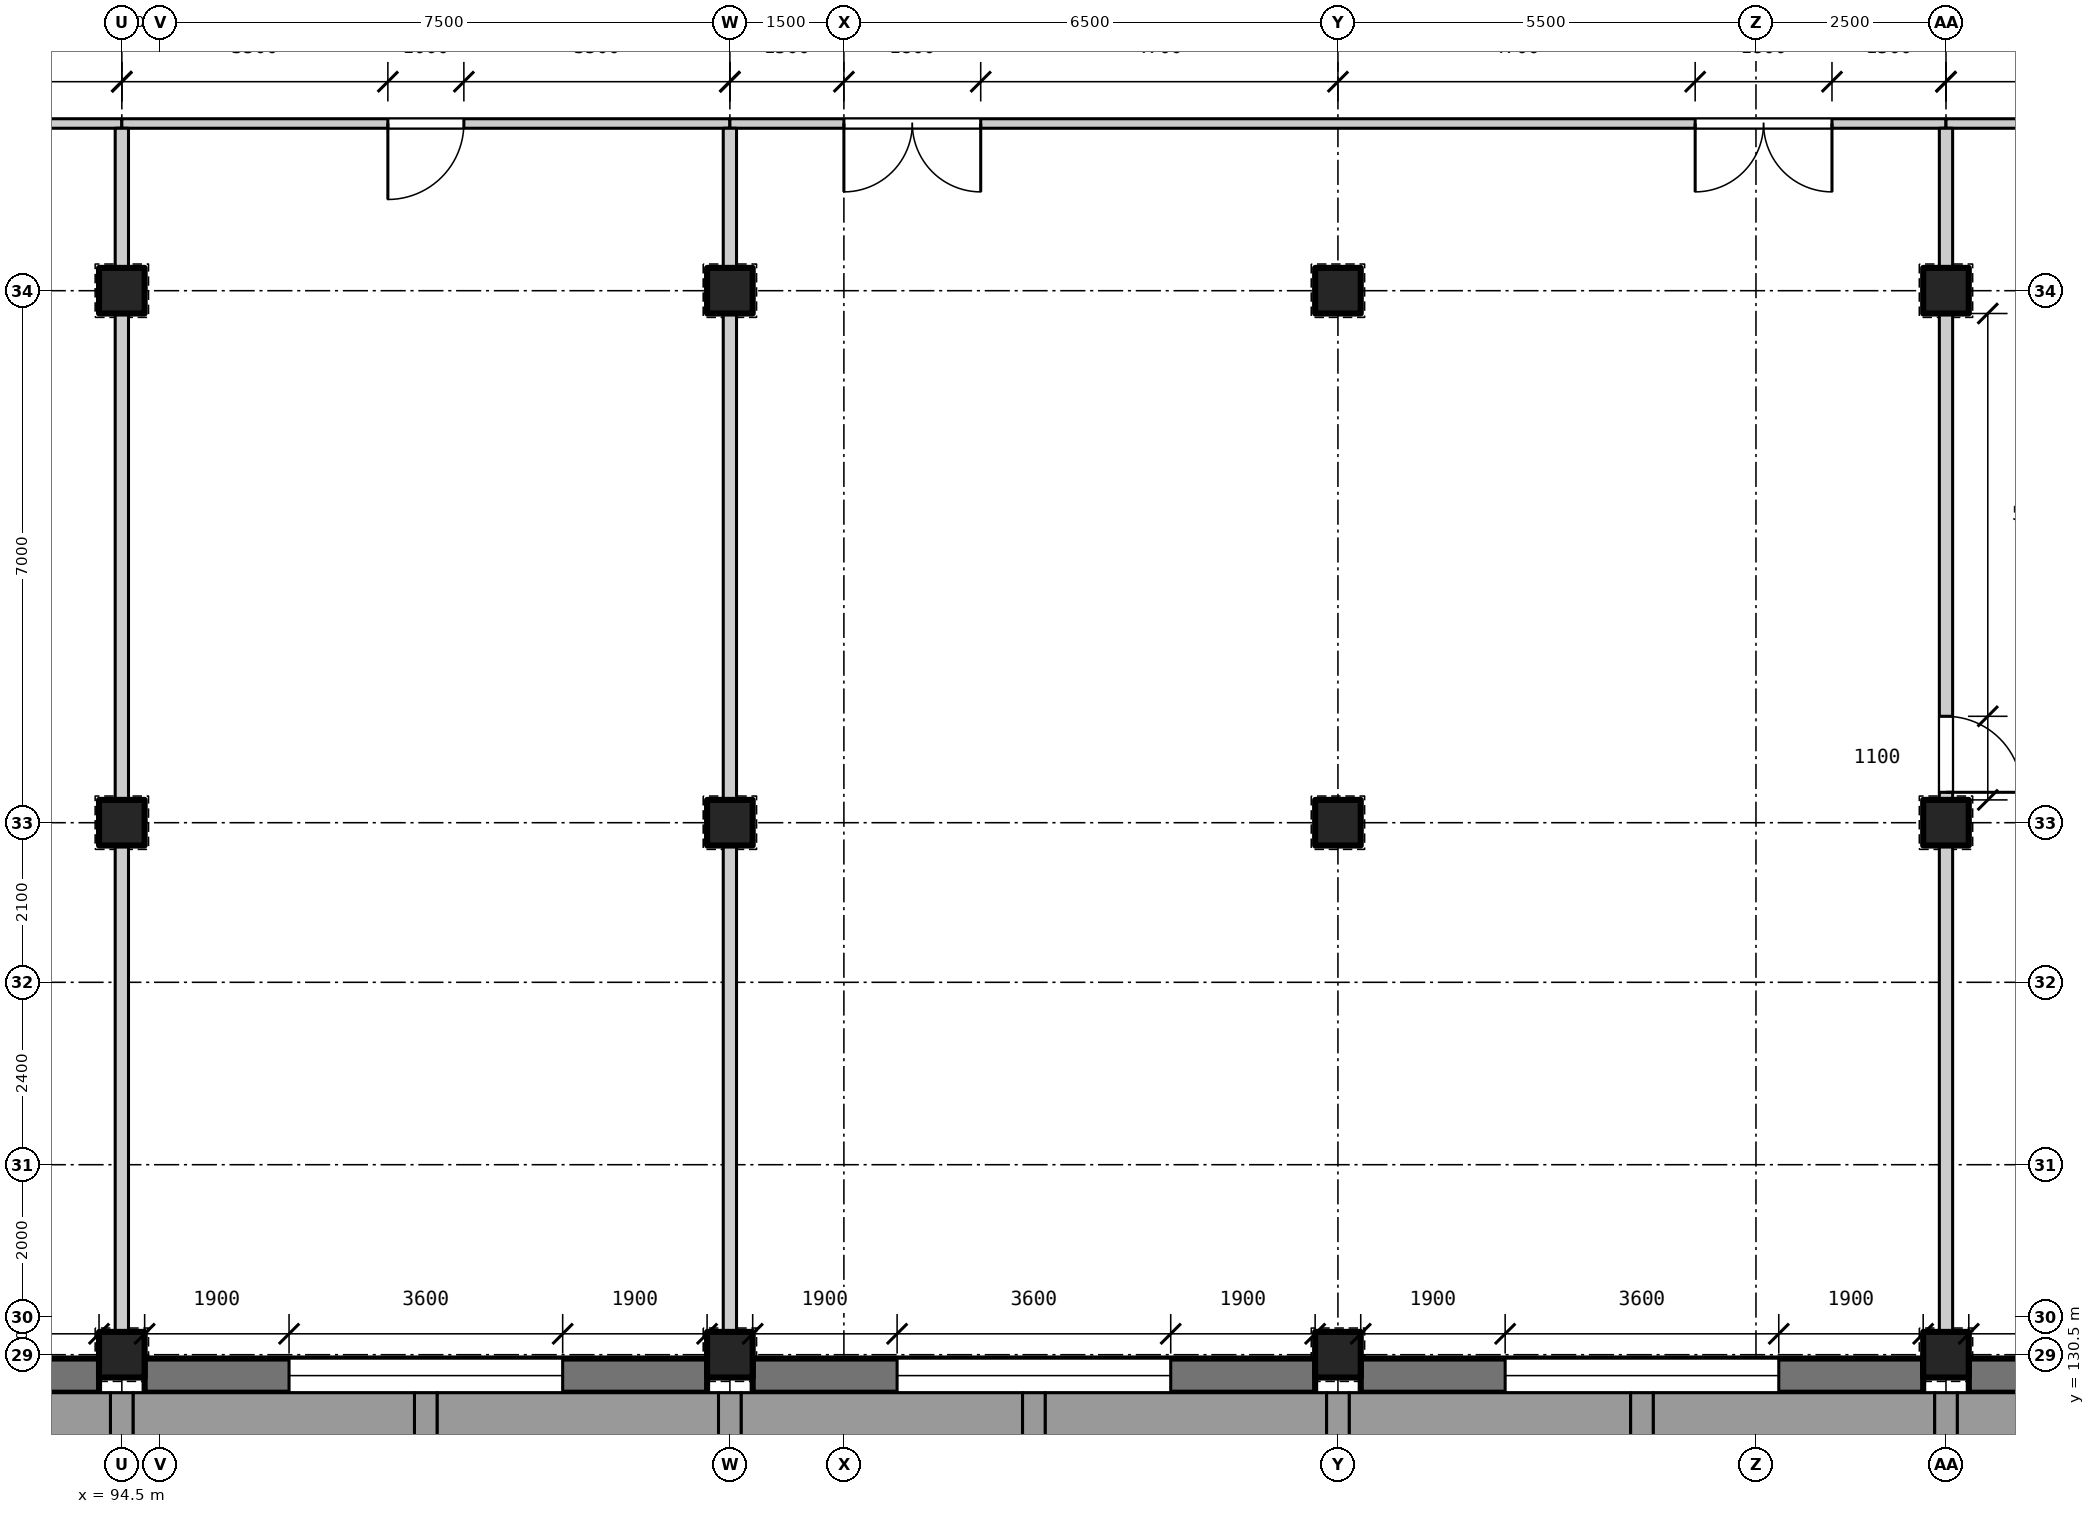
"""IFC4 building model, lengths in metres.
Left out: names, types, materials, properties, quantities, classifications, styles, units other than length and angle.
Written with IfcOpenShell. Run it as: python <this file> out.ifc"""

import sys

from ifc_helpers import new_model, si_unit, direction, frame, frame_2d, origin, origin_2d, place, context, subcontext, project, spatial, rectangle, extrude, element, fill, save


model = new_model("IFC4")
c1 = context("Model", 3, precision=1e-05, world=origin(), true_north=direction((0.0, 1.0)))
c2 = subcontext(c1, "Body", "Model", "MODEL_VIEW")
j1 = project(units=[si_unit("LENGTHUNIT", "METRE"), si_unit("PLANEANGLEUNIT", "RADIAN")], contexts=[c1])
p1 = place(None, origin())
s1 = spatial("IfcSite", under=j1, at=p1, CompositionType="ELEMENT")
p2 = place(p1, origin())
s2 = spatial("IfcBuilding", under=s1, at=p2, CompositionType="ELEMENT")
p3 = place(p2, frame((0.0, 0.0, 10.2)))
s3 = spatial("IfcBuildingStorey", under=s2, at=p3, CompositionType="ELEMENT", Elevation=10.2)
for number, where, z_axis, x_axis in (
    (1, (94.5, 130.5, 0.0), (0.0, 0.0, 1.0), (1.0, 0.0, 0.0)),
    (2, (94.5, 137.5, 0.0), (0.0, 0.0, 1.0), (1.0, 0.0, 0.0)),
    (3, (94.5, 144.5, 0.0), (0.0, 0.0, 1.0), (1.0, 0.0, 0.0)),
    (4, (102.5, 130.5, 0.0), (0.0, 0.0, 1.0), (1.0, 0.0, 0.0)),
    (5, (102.5, 137.5, 0.0), (0.0, 0.0, 1.0), (1.0, 0.0, 0.0)),
    (6, (102.5, 144.5, 0.0), (0.0, 0.0, 1.0), (1.0, 0.0, 0.0)),
    (7, (110.5, 130.5, 0.0), (0.0, 0.0, 1.0), (1.0, 0.0, 0.0)),
    (8, (110.5, 137.5, 0.0), (0.0, 0.0, 1.0), (1.0, 0.0, 0.0)),
    (9, (110.5, 144.5, 0.0), (0.0, 0.0, 1.0), (1.0, 0.0, 0.0)),
    (10, (118.5, 130.5, 0.0), (0.0, 0.0, 1.0), (1.0, 0.0, 0.0)),
    (11, (118.5, 137.5, 0.0), (0.0, 0.0, 1.0), (1.0, 0.0, 0.0)),
    (12, (118.5, 144.5, 0.0), (0.0, 0.0, 1.0), (1.0, 0.0, 0.0)),
):
    element("IfcColumn", number, at=place(p3, frame(where, z_axis=z_axis, x_axis=x_axis)), inside=s3, PredefinedType="COLUMN", context=c2, shape_type="SweptSolid", body=[
        extrude(rectangle(XDim=0.6, YDim=0.6, at=origin_2d()), origin(), (0.0, 0.0, 1.0), 4.2),
    ])
p4 = place(p3, frame((94.2, 130.225, 0.0), z_axis=(0.0, 0.0, 1.0), x_axis=(-1.0, 0.0, 0.0)))
e13 = element("IfcWall", 13, at=p4, inside=s3, PredefinedType="SOLIDWALL", context=c2, shape_type="SweptSolid", body=[
    extrude(rectangle(XDim=7.4, YDim=0.45, at=frame_2d((3.7, 0.0))), origin(), (0.0, 0.0, 1.0), 3.1),
])
p5 = place(p4, frame((1.9, 0.0, 0.9)))
e14 = element("IfcOpeningElement", 14, at=p5, cuts=e13, PredefinedType="OPENING", context=c2, shape_type="SweptSolid", body=[
    extrude(rectangle(XDim=3.6, YDim=1.6, at=frame_2d((1.8, 0.8))), frame((0.0, 0.235, 0.0), z_axis=(0.0, -1.0, 0.0), x_axis=(1.0, 0.0, 0.0)), (0.0, 0.0, 1.0), 0.47),
])
p6 = place(p3, frame((102.2, 130.225, 0.0), z_axis=(0.0, 0.0, 1.0), x_axis=(-1.0, 0.0, 0.0)))
e15 = element("IfcWall", 15, at=p6, inside=s3, PredefinedType="SOLIDWALL", context=c2, shape_type="SweptSolid", body=[
    extrude(rectangle(XDim=7.4, YDim=0.45, at=frame_2d((3.7, 0.0))), origin(), (0.0, 0.0, 1.0), 3.1),
])
p7 = place(p6, frame((1.9, 0.0, 0.9)))
e16 = element("IfcOpeningElement", 16, at=p7, cuts=e15, PredefinedType="OPENING", context=c2, shape_type="SweptSolid", body=[
    extrude(rectangle(XDim=3.6, YDim=1.6, at=frame_2d((1.8, 0.8))), frame((0.0, 0.235, 0.0), z_axis=(0.0, -1.0, 0.0), x_axis=(1.0, 0.0, 0.0)), (0.0, 0.0, 1.0), 0.47),
])
p8 = place(p3, frame((110.2, 130.225, 0.0), z_axis=(0.0, 0.0, 1.0), x_axis=(-1.0, 0.0, 0.0)))
e17 = element("IfcWall", 17, at=p8, inside=s3, PredefinedType="SOLIDWALL", context=c2, shape_type="SweptSolid", body=[
    extrude(rectangle(XDim=7.4, YDim=0.45, at=frame_2d((3.7, 0.0))), origin(), (0.0, 0.0, 1.0), 3.1),
])
p9 = place(p8, frame((1.9, 0.0, 0.9)))
e18 = element("IfcOpeningElement", 18, at=p9, cuts=e17, PredefinedType="OPENING", context=c2, shape_type="SweptSolid", body=[
    extrude(rectangle(XDim=3.6, YDim=1.6, at=frame_2d((1.8, 0.8))), frame((0.0, 0.235, 0.0), z_axis=(0.0, -1.0, 0.0), x_axis=(1.0, 0.0, 0.0)), (0.0, 0.0, 1.0), 0.47),
])
p10 = place(p3, frame((118.2, 130.225, 0.0), z_axis=(0.0, 0.0, 1.0), x_axis=(-1.0, 0.0, 0.0)))
e19 = element("IfcWall", 19, at=p10, inside=s3, PredefinedType="SOLIDWALL", context=c2, shape_type="SweptSolid", body=[
    extrude(rectangle(XDim=7.4, YDim=0.45, at=frame_2d((3.7, 0.0))), origin(), (0.0, 0.0, 1.0), 3.1),
])
p11 = place(p10, frame((1.9, 0.0, 0.9)))
e20 = element("IfcOpeningElement", 20, at=p11, cuts=e19, PredefinedType="OPENING", context=c2, shape_type="SweptSolid", body=[
    extrude(rectangle(XDim=3.6, YDim=1.6, at=frame_2d((1.8, 0.8))), frame((0.0, 0.235, 0.0), z_axis=(0.0, -1.0, 0.0), x_axis=(1.0, 0.0, 0.0)), (0.0, 0.0, 1.0), 0.47),
])
p12 = place(p3, frame((126.2, 130.225, 0.0), z_axis=(0.0, 0.0, 1.0), x_axis=(-1.0, 0.0, 0.0)))
e21 = element("IfcWall", 21, at=p12, inside=s3, PredefinedType="SOLIDWALL", context=c2, shape_type="SweptSolid", body=[
    extrude(rectangle(XDim=7.4, YDim=0.45, at=frame_2d((3.7, 0.0))), origin(), (0.0, 0.0, 1.0), 3.1),
])
p13 = place(p12, frame((1.9, 0.0, 0.9)))
e22 = element("IfcOpeningElement", 22, at=p13, cuts=e21, PredefinedType="OPENING", context=c2, shape_type="SweptSolid", body=[
    extrude(rectangle(XDim=3.6, YDim=1.6, at=frame_2d((1.8, 0.8))), frame((0.0, 0.235, 0.0), z_axis=(0.0, -1.0, 0.0), x_axis=(1.0, 0.0, 0.0)), (0.0, 0.0, 1.0), 0.47),
])
p14 = place(p3, frame((86.45, 146.7, 0.0), z_axis=(0.0, 0.0, 1.0), x_axis=(1.0, 0.0, 0.0)))
e23 = element("IfcWall", 23, at=p14, inside=s3, PredefinedType="PARTITIONING", context=c2, shape_type="SweptSolid", body=[
    extrude(rectangle(XDim=8.05, YDim=0.125, at=frame_2d((4.025, 0.0))), origin(), (0.0, 0.0, 1.0), 3.9),
])
p15 = place(p14, frame((3.55, 0.0, 0.0)))
e24 = element("IfcOpeningElement", 24, at=p15, cuts=e23, PredefinedType="OPENING", context=c2, shape_type="SweptSolid", body=[
    extrude(rectangle(XDim=1.0, YDim=2.1, at=frame_2d((0.5, 1.05))), frame((0.0, 0.073, 0.0), z_axis=(0.0, -1.0, 0.0), x_axis=(1.0, 0.0, 0.0)), (0.0, 0.0, 1.0), 0.145),
])
p16 = place(p3, frame((94.5, 146.7, 0.0), z_axis=(0.0, 0.0, 1.0), x_axis=(1.0, 0.0, 0.0)))
e25 = element("IfcWall", 25, at=p16, inside=s3, PredefinedType="PARTITIONING", context=c2, shape_type="SweptSolid", body=[
    extrude(rectangle(XDim=8.0, YDim=0.125, at=frame_2d((4.0, 0.0))), origin(), (0.0, 0.0, 1.0), 3.9),
])
p17 = place(p16, frame((3.5, 0.0, 0.0)))
e26 = element("IfcOpeningElement", 26, at=p17, cuts=e25, PredefinedType="OPENING", context=c2, shape_type="SweptSolid", body=[
    extrude(rectangle(XDim=1.0, YDim=2.1, at=frame_2d((0.5, 1.05))), frame((0.0, 0.073, 0.0), z_axis=(0.0, -1.0, 0.0), x_axis=(1.0, 0.0, 0.0)), (0.0, 0.0, 1.0), 0.145),
])
p18 = place(p3, frame((102.5, 146.7, 0.0), z_axis=(0.0, 0.0, 1.0), x_axis=(1.0, 0.0, 0.0)))
e27 = element("IfcWall", 27, at=p18, inside=s3, PredefinedType="PARTITIONING", context=c2, shape_type="SweptSolid", body=[
    extrude(rectangle(XDim=16.0, YDim=0.125, at=frame_2d((8.0, 0.0))), origin(), (0.0, 0.0, 1.0), 3.9),
])
p19 = place(p18, frame((1.5, 0.0, 0.0)))
e28 = element("IfcOpeningElement", 28, at=p19, cuts=e27, PredefinedType="OPENING", context=c2, shape_type="SweptSolid", body=[
    extrude(rectangle(XDim=1.8, YDim=2.1, at=frame_2d((0.9, 1.05))), frame((0.0, 0.073, 0.0), z_axis=(0.0, -1.0, 0.0), x_axis=(1.0, 0.0, 0.0)), (0.0, 0.0, 1.0), 0.145),
])
p20 = place(p18, frame((12.7, 0.0, 0.0)))
e29 = element("IfcOpeningElement", 29, at=p20, cuts=e27, PredefinedType="OPENING", context=c2, shape_type="SweptSolid", body=[
    extrude(rectangle(XDim=1.8, YDim=2.1, at=frame_2d((0.9, 1.05))), frame((0.0, 0.073, 0.0), z_axis=(0.0, -1.0, 0.0), x_axis=(1.0, 0.0, 0.0)), (0.0, 0.0, 1.0), 0.145),
])
p21 = place(p3, frame((118.5, 146.7, 0.0), z_axis=(0.0, 0.0, 1.0), x_axis=(1.0, 0.0, 0.0)))
e30 = element("IfcWall", 30, at=p21, inside=s3, PredefinedType="PARTITIONING", context=c2, shape_type="SweptSolid", body=[
    extrude(rectangle(XDim=8.0, YDim=0.125, at=frame_2d((4.0, 0.0))), origin(), (0.0, 0.0, 1.0), 3.9),
])
p22 = place(p21, frame((3.5, 0.0, 0.0)))
e31 = element("IfcOpeningElement", 31, at=p22, cuts=e30, PredefinedType="OPENING", context=c2, shape_type="SweptSolid", body=[
    extrude(rectangle(XDim=1.0, YDim=2.1, at=frame_2d((0.5, 1.05))), frame((0.0, 0.073, 0.0), z_axis=(0.0, -1.0, 0.0), x_axis=(1.0, 0.0, 0.0)), (0.0, 0.0, 1.0), 0.145),
])
for number, where, z_axis, x_axis in (
    (32, (94.5, 130.8, 0.0), (0.0, 0.0, 1.0), (0.0, 1.0, 0.0)),
    (33, (94.5, 137.8, 0.0), (0.0, 0.0, 1.0), (0.0, 1.0, 0.0)),
):
    element("IfcWall", number, at=place(p3, frame(where, z_axis=z_axis, x_axis=x_axis)), inside=s3, PredefinedType="PARTITIONING", context=c2, shape_type="SweptSolid", body=[
        extrude(rectangle(XDim=6.4, YDim=0.175, at=frame_2d((3.2, 0.0))), origin(), (0.0, 0.0, 1.0), 3.2),
    ])
p23 = place(p3, frame((94.5, 144.8, 0.0), z_axis=(0.0, 0.0, 1.0), x_axis=(0.0, 1.0, 0.0)))
e34 = element("IfcWall", 34, at=p23, inside=s3, PredefinedType="PARTITIONING", context=c2, shape_type="SweptSolid", body=[
    extrude(rectangle(XDim=1.837, YDim=0.175, at=frame_2d((0.919, 0.0))), origin(), (0.0, 0.0, 1.0), 3.2),
])
for number, where, z_axis, x_axis in (
    (35, (102.5, 130.8, 0.0), (0.0, 0.0, 1.0), (0.0, 1.0, 0.0)),
    (36, (102.5, 137.8, 0.0), (0.0, 0.0, 1.0), (0.0, 1.0, 0.0)),
):
    element("IfcWall", number, at=place(p3, frame(where, z_axis=z_axis, x_axis=x_axis)), inside=s3, PredefinedType="PARTITIONING", context=c2, shape_type="SweptSolid", body=[
        extrude(rectangle(XDim=6.4, YDim=0.175, at=frame_2d((3.2, 0.0))), origin(), (0.0, 0.0, 1.0), 3.2),
    ])
p24 = place(p3, frame((102.5, 144.8, 0.0), z_axis=(0.0, 0.0, 1.0), x_axis=(0.0, 1.0, 0.0)))
e37 = element("IfcWall", 37, at=p24, inside=s3, PredefinedType="PARTITIONING", context=c2, shape_type="SweptSolid", body=[
    extrude(rectangle(XDim=1.837, YDim=0.175, at=frame_2d((0.919, 0.0))), origin(), (0.0, 0.0, 1.0), 3.2),
])
p25 = place(p3, frame((118.5, 130.8, 0.0), z_axis=(0.0, 0.0, 1.0), x_axis=(0.0, 1.0, 0.0)))
e38 = element("IfcWall", 38, at=p25, inside=s3, PredefinedType="PARTITIONING", context=c2, shape_type="SweptSolid", body=[
    extrude(rectangle(XDim=6.4, YDim=0.175, at=frame_2d((3.2, 0.0))), origin(), (0.0, 0.0, 1.0), 3.2),
])
p26 = place(p3, frame((118.5, 137.8, 0.0), z_axis=(0.0, 0.0, 1.0), x_axis=(0.0, 1.0, 0.0)))
e39 = element("IfcWall", 39, at=p26, inside=s3, PredefinedType="PARTITIONING", context=c2, shape_type="SweptSolid", body=[
    extrude(rectangle(XDim=6.4, YDim=0.175, at=frame_2d((3.2, 0.0))), origin(), (0.0, 0.0, 1.0), 3.2),
])
p27 = place(p26, frame((0.1, 0.0, 0.0)))
e40 = element("IfcOpeningElement", 40, at=p27, cuts=e39, PredefinedType="OPENING", context=c2, shape_type="SweptSolid", body=[
    extrude(rectangle(XDim=1.0, YDim=2.1, at=frame_2d((0.5, 1.05))), frame((0.0, 0.097, 0.0), z_axis=(0.0, -1.0, 0.0), x_axis=(1.0, 0.0, 0.0)), (0.0, 0.0, 1.0), 0.195),
])
p28 = place(p3, frame((118.5, 144.8, 0.0), z_axis=(0.0, 0.0, 1.0), x_axis=(0.0, 1.0, 0.0)))
e41 = element("IfcWall", 41, at=p28, inside=s3, PredefinedType="PARTITIONING", context=c2, shape_type="SweptSolid", body=[
    extrude(rectangle(XDim=1.837, YDim=0.175, at=frame_2d((0.919, 0.0))), origin(), (0.0, 0.0, 1.0), 3.2),
])
p29 = place(p7, origin())
e42 = element("IfcWindow", 42, at=p29, inside=s3, PartitioningType="SINGLE_PANEL", PredefinedType="WINDOW", context=c2, shape_type="SweptSolid", body=[
    extrude(rectangle(XDim=3.6, YDim=1.6, at=frame_2d((1.8, 0.8))), frame((0.0, -0.125, 0.0), z_axis=(0.0, -1.0, 0.0), x_axis=(1.0, 0.0, 0.0)), (0.0, 0.0, 1.0), 0.06),
])
fill(e16, e42)
p30 = place(p9, origin())
e43 = element("IfcWindow", 43, at=p30, inside=s3, PartitioningType="SINGLE_PANEL", PredefinedType="WINDOW", context=c2, shape_type="SweptSolid", body=[
    extrude(rectangle(XDim=3.6, YDim=1.6, at=frame_2d((1.8, 0.8))), frame((0.0, -0.125, 0.0), z_axis=(0.0, -1.0, 0.0), x_axis=(1.0, 0.0, 0.0)), (0.0, 0.0, 1.0), 0.06),
])
fill(e18, e43)
p31 = place(p11, origin())
e44 = element("IfcWindow", 44, at=p31, inside=s3, PartitioningType="SINGLE_PANEL", PredefinedType="WINDOW", context=c2, shape_type="SweptSolid", body=[
    extrude(rectangle(XDim=3.6, YDim=1.6, at=frame_2d((1.8, 0.8))), frame((0.0, -0.125, 0.0), z_axis=(0.0, -1.0, 0.0), x_axis=(1.0, 0.0, 0.0)), (0.0, 0.0, 1.0), 0.06),
])
fill(e20, e44)
p32 = place(p27, frame((1.0, 0.0, 0.0), z_axis=(0.0, 0.0, 1.0), x_axis=(-1.0, 0.0, 0.0)))
e45 = element("IfcDoor", 45, at=p32, inside=s3, OperationType="SINGLE_SWING_RIGHT", PredefinedType="DOOR", context=c2, shape_type="SweptSolid", body=[
    extrude(rectangle(XDim=1.0, YDim=2.1, at=frame_2d((0.5, 1.05))), frame((0.0, 0.025, 0.0), z_axis=(0.0, -1.0, 0.0), x_axis=(1.0, 0.0, 0.0)), (0.0, 0.0, 1.0), 0.05),
])
fill(e40, e45)
p33 = place(p17, frame((1.0, 0.0, 0.0), z_axis=(0.0, 0.0, 1.0), x_axis=(-1.0, 0.0, 0.0)))
e46 = element("IfcDoor", 46, at=p33, inside=s3, OperationType="SINGLE_SWING_RIGHT", PredefinedType="DOOR", context=c2, shape_type="SweptSolid", body=[
    extrude(rectangle(XDim=1.0, YDim=2.1, at=frame_2d((0.5, 1.05))), frame((0.0, 0.025, 0.0), z_axis=(0.0, -1.0, 0.0), x_axis=(1.0, 0.0, 0.0)), (0.0, 0.0, 1.0), 0.05),
])
fill(e26, e46)
p34 = place(p19, frame((1.8, 0.0, 0.0), z_axis=(0.0, 0.0, 1.0), x_axis=(-1.0, 0.0, 0.0)))
e47 = element("IfcDoor", 47, at=p34, inside=s3, OperationType="DOUBLE_DOOR_SINGLE_SWING", PredefinedType="DOOR", context=c2, shape_type="SweptSolid", body=[
    extrude(rectangle(XDim=1.8, YDim=2.1, at=frame_2d((0.9, 1.05))), frame((0.0, 0.025, 0.0), z_axis=(0.0, -1.0, 0.0), x_axis=(1.0, 0.0, 0.0)), (0.0, 0.0, 1.0), 0.05),
])
fill(e28, e47)
p35 = place(p20, frame((1.8, 0.0, 0.0), z_axis=(0.0, 0.0, 1.0), x_axis=(-1.0, 0.0, 0.0)))
e48 = element("IfcDoor", 48, at=p35, inside=s3, OperationType="DOUBLE_DOOR_SINGLE_SWING", PredefinedType="DOOR", context=c2, shape_type="SweptSolid", body=[
    extrude(rectangle(XDim=1.8, YDim=2.1, at=frame_2d((0.9, 1.05))), frame((0.0, 0.025, 0.0), z_axis=(0.0, -1.0, 0.0), x_axis=(1.0, 0.0, 0.0)), (0.0, 0.0, 1.0), 0.05),
])
fill(e29, e48)
save(model, sys.argv[1])
